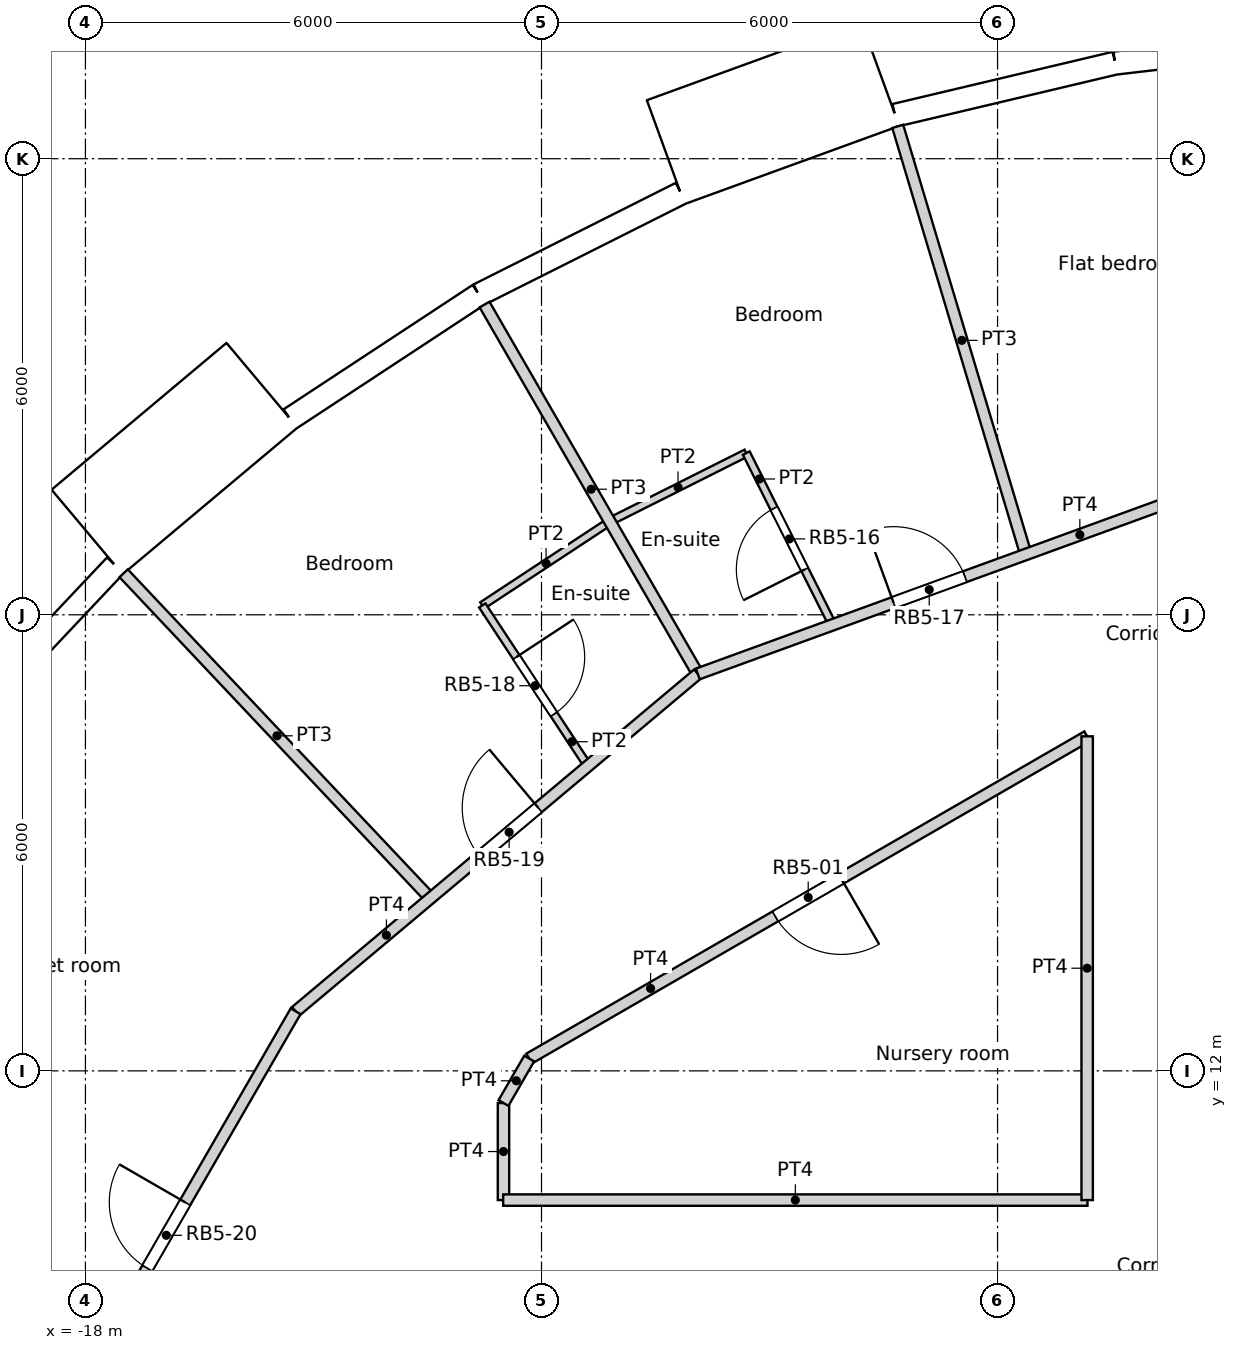
"""IFC4 building model, lengths in metres.
Left out: names, types, materials, properties, quantities, classifications, styles, units other than length and angle.
Written with IfcOpenShell. Run it as: python <this file> out.ifc"""

import sys

from ifc_helpers import new_model, si_unit, direction, frame, frame_2d, origin, origin_2d, place, context, subcontext, project, spatial, rectangle, circle, extrude, element, fill, save


model = new_model("IFC4")
c1 = context("Model", 3, precision=1e-05, world=origin(), true_north=direction((0.0, 1.0)))
c2 = subcontext(c1, "Body", "Model", "MODEL_VIEW")
j1 = project(units=[si_unit("LENGTHUNIT", "METRE"), si_unit("PLANEANGLEUNIT", "RADIAN")], contexts=[c1])
p1 = place(None, origin())
s1 = spatial("IfcSite", under=j1, at=p1, CompositionType="ELEMENT")
p2 = place(p1, origin())
s2 = spatial("IfcBuilding", under=s1, at=p2, CompositionType="ELEMENT")
p3 = place(p2, frame((0.0, 0.0, 169.2)))
s3 = spatial("IfcBuildingStorey", under=s2, at=p3, CompositionType="ELEMENT", Elevation=169.2)
for number, where, z_axis, x_axis in (
    (1, (-7.04, 23.516, 0.0), (0.0, 0.0, 1.0), (1.0, 0.0, 0.0)),
    (2, (-12.274, 21.259, 0.0), (0.0, 0.0, 1.0), (1.0, 0.0, 0.0)),
    (3, (-16.846, 17.855, 0.0), (0.0, 0.0, 1.0), (1.0, 0.0, 0.0)),
):
    element("IfcColumn", number, at=place(p3, frame(where, z_axis=z_axis, x_axis=x_axis)), inside=s3, PredefinedType="COLUMN", context=c2, shape_type="SweptSolid", body=[
        extrude(circle(Radius=0.6, at=origin_2d()), origin(), (0.0, 0.0, 1.0), 3.6),
    ])
for number, where, z_axis, x_axis in (
    (4, (-4.188, 18.35, 0.0), (0.0, 0.0, 1.0), (1.0, 0.0, 0.0)),
    (5, (-9.411, 16.301, 0.0), (0.0, 0.0, 1.0), (1.0, 0.0, 0.0)),
    (6, (-13.798, 12.802, 0.0), (0.0, 0.0, 1.0), (1.0, 0.0, 0.0)),
):
    element("IfcColumn", number, at=place(p3, frame(where, z_axis=z_axis, x_axis=x_axis)), inside=s3, PredefinedType="COLUMN", context=c2, shape_type="SweptSolid", body=[
        extrude(circle(Radius=0.65, at=origin_2d()), origin(), (0.0, 0.0, 1.0), 3.6),
    ])
p4 = place(p3, frame((-1.501, 25.603, 0.0), z_axis=(0.0, 0.0, 1.0), x_axis=(-0.993235542767, -0.116116995244, 0.0)))
e7 = element("IfcWall", 7, at=p4, inside=s3, PredefinedType="SOLIDWALL", context=c2, shape_type="SweptSolid", body=[
    extrude(rectangle(XDim=2.973, YDim=0.3, at=frame_2d((1.486, 0.0))), origin(), (0.0, 0.0, 1.0), 3.3),
])
p5 = place(p4, frame((1.486, 0.0, 1.55)))
e8 = element("IfcOpeningElement", 8, at=p5, cuts=e7, PredefinedType="OPENING", context=c2, shape_type="SweptSolid", body=[
    extrude(circle(Radius=0.9, at=origin_2d()), frame((0.0, 0.16, 0.0), z_axis=(0.0, -1.0, 0.0), x_axis=(1.0, 0.0, 0.0)), (0.0, 0.0, 1.0), 0.32),
])
p6 = place(p3, frame((-4.454, 25.258, 0.0), z_axis=(0.0, 0.0, 1.0), x_axis=(-0.973049746156, -0.230595298102, 0.0)))
e9 = element("IfcWall", 9, at=p6, inside=s3, PredefinedType="SOLIDWALL", context=c2, shape_type="SweptSolid", body=[
    extrude(rectangle(XDim=2.973, YDim=0.3, at=frame_2d((1.486, 0.0))), origin(), (0.0, 0.0, 1.0), 3.3),
])
p7 = place(p6, frame((1.486, 0.0, 1.55)))
e10 = element("IfcOpeningElement", 10, at=p7, cuts=e9, PredefinedType="OPENING", context=c2, shape_type="SweptSolid", body=[
    extrude(circle(Radius=0.9, at=origin_2d()), frame((0.0, 0.16, 0.0), z_axis=(0.0, -1.0, 0.0), x_axis=(1.0, 0.0, 0.0)), (0.0, 0.0, 1.0), 0.32),
])
p8 = place(p3, frame((-7.544, 25.113, -0.3), z_axis=(0.0, 0.0, 1.0), x_axis=(-0.939686455819, -0.342037080957, 0.0)))
e11 = element("IfcWall", 11, at=p8, inside=s3, PredefinedType="ELEMENTEDWALL", context=c2, shape_type="SweptSolid", body=[
    extrude(rectangle(XDim=3.0, YDim=1.45, at=frame_2d((1.5, 0.0))), origin(), (0.0, 0.0, 1.0), 3.6),
])
p9 = place(p8, frame((1.5, 0.0, 1.85)))
e12 = element("IfcOpeningElement", 12, at=p9, cuts=e11, PredefinedType="OPENING", context=c2, shape_type="SweptSolid", body=[
    extrude(circle(Radius=0.9, at=origin_2d()), frame((0.0, 0.735, 0.0), z_axis=(0.0, -1.0, 0.0), x_axis=(1.0, 0.0, 0.0)), (0.0, 0.0, 1.0), 1.47),
])
p10 = place(p3, frame((-10.167, 23.546, 0.0), z_axis=(0.0, 0.0, 1.0), x_axis=(-0.893637442555, -0.448789618045, 0.0)))
e13 = element("IfcWall", 13, at=p10, inside=s3, PredefinedType="SOLIDWALL", context=c2, shape_type="SweptSolid", body=[
    extrude(rectangle(XDim=2.973, YDim=0.3, at=frame_2d((1.486, 0.0))), origin(), (0.0, 0.0, 1.0), 3.3),
])
p11 = place(p10, frame((1.486, 0.0, 1.55)))
e14 = element("IfcOpeningElement", 14, at=p11, cuts=e13, PredefinedType="OPENING", context=c2, shape_type="SweptSolid", body=[
    extrude(circle(Radius=0.9, at=origin_2d()), frame((0.0, 0.16, 0.0), z_axis=(0.0, -1.0, 0.0), x_axis=(1.0, 0.0, 0.0)), (0.0, 0.0, 1.0), 0.32),
])
p12 = place(p3, frame((-12.824, 22.211, 0.0), z_axis=(0.0, 0.0, 1.0), x_axis=(-0.835470659512, -0.549535055382, 0.0)))
e15 = element("IfcWall", 15, at=p12, inside=s3, PredefinedType="SOLIDWALL", context=c2, shape_type="SweptSolid", body=[
    extrude(rectangle(XDim=2.973, YDim=0.3, at=frame_2d((1.487, 0.0))), origin(), (0.0, 0.0, 1.0), 3.3),
])
p13 = place(p12, frame((1.486, 0.0, 1.55)))
e16 = element("IfcOpeningElement", 16, at=p13, cuts=e15, PredefinedType="OPENING", context=c2, shape_type="SweptSolid", body=[
    extrude(circle(Radius=0.9, at=origin_2d()), frame((0.0, 0.16, 0.0), z_axis=(0.0, -1.0, 0.0), x_axis=(1.0, 0.0, 0.0)), (0.0, 0.0, 1.0), 0.32),
])
p14 = place(p3, frame((-15.678, 21.019, -0.3), z_axis=(0.0, 0.0, 1.0), x_axis=(-0.766022196139, -0.642814121673, 0.0)))
e17 = element("IfcWall", 17, at=p14, inside=s3, PredefinedType="ELEMENTEDWALL", context=c2, shape_type="SweptSolid", body=[
    extrude(rectangle(XDim=3.0, YDim=1.45, at=frame_2d((1.5, 0.0))), origin(), (0.0, 0.0, 1.0), 3.6),
])
p15 = place(p14, frame((1.5, 0.0, 1.85)))
e18 = element("IfcOpeningElement", 18, at=p15, cuts=e17, PredefinedType="OPENING", context=c2, shape_type="SweptSolid", body=[
    extrude(circle(Radius=0.9, at=origin_2d()), frame((0.0, 0.735, 0.0), z_axis=(0.0, -1.0, 0.0), x_axis=(1.0, 0.0, 0.0)), (0.0, 0.0, 1.0), 1.47),
])
p16 = place(p3, frame((-17.607, 18.648, 0.0), z_axis=(0.0, 0.0, 1.0), x_axis=(-0.686235184166, -0.727379730273, 0.0)))
e19 = element("IfcWall", 19, at=p16, inside=s3, PredefinedType="SOLIDWALL", context=c2, shape_type="SweptSolid", body=[
    extrude(rectangle(XDim=2.973, YDim=0.3, at=frame_2d((1.486, 0.0))), origin(), (0.0, 0.0, 1.0), 3.3),
])
p17 = place(p16, frame((1.486, 0.0, 1.55)))
e20 = element("IfcOpeningElement", 20, at=p17, cuts=e19, PredefinedType="OPENING", context=c2, shape_type="SweptSolid", body=[
    extrude(circle(Radius=0.9, at=origin_2d()), frame((0.0, 0.16, 0.0), z_axis=(0.0, -1.0, 0.0), x_axis=(1.0, 0.0, 0.0)), (0.0, 0.0, 1.0), 0.32),
])
p18 = place(p3, frame((-12.504, 10.3, 0.0), z_axis=(0.0, 0.0, 1.0), x_axis=(1.0, 0.0, 0.0)))
e21 = element("IfcWall", 21, at=p18, inside=s3, PredefinedType="PARTITIONING", context=c2, shape_type="SweptSolid", body=[
    extrude(rectangle(XDim=7.687, YDim=0.15, at=frame_2d((3.844, 0.0))), origin(), (0.0, 0.0, 1.0), 3.3),
])
p19 = place(p3, frame((-4.821, 10.3, 0.0), z_axis=(0.0, 0.0, 1.0), x_axis=(0.0, 1.0, 0.0)))
e22 = element("IfcWall", 22, at=p19, inside=s3, PredefinedType="PARTITIONING", context=c2, shape_type="SweptSolid", body=[
    extrude(rectangle(XDim=6.101, YDim=0.15, at=frame_2d((3.05, 0.0))), origin(), (0.0, 0.0, 1.0), 3.3),
])
p20 = place(p3, frame((-12.162, 12.162, 0.0), z_axis=(0.0, 0.0, 1.0), x_axis=(0.866004766557, 0.500035743023, 0.0)))
e23 = element("IfcWall", 23, at=p20, inside=s3, PredefinedType="PARTITIONING", context=c2, shape_type="SweptSolid", body=[
    extrude(rectangle(XDim=8.477, YDim=0.15, at=frame_2d((4.239, 0.0))), origin(), (0.0, 0.0, 1.0), 3.3),
])
p21 = place(p20, frame((3.739, 0.0, 0.0)))
e24 = element("IfcOpeningElement", 24, at=p21, cuts=e23, PredefinedType="OPENING", context=c2, shape_type="SweptSolid", body=[
    extrude(rectangle(XDim=1.0, YDim=2.04, at=frame_2d((0.5, 1.02))), frame((0.0, 0.075, 0.0), z_axis=(0.0, -1.0, 0.0), x_axis=(1.0, 0.0, 0.0)), (0.0, 0.0, 1.0), 0.15),
])
p22 = place(p3, frame((-9.944, 17.222, 0.0), z_axis=(0.0, 0.0, 1.0), x_axis=(0.939607544688, 0.342253797591, 0.0)))
e25 = element("IfcWall", 25, at=p22, inside=s3, PredefinedType="PARTITIONING", context=c2, shape_type="SweptSolid", body=[
    extrude(rectangle(XDim=6.908, YDim=0.15, at=frame_2d((3.454, 0.0))), origin(), (0.0, 0.0, 1.0), 3.3),
])
p23 = place(p22, frame((2.74, 0.0, 0.0)))
e26 = element("IfcOpeningElement", 26, at=p23, cuts=e25, PredefinedType="OPENING", context=c2, shape_type="SweptSolid", body=[
    extrude(rectangle(XDim=1.0, YDim=2.1, at=frame_2d((0.5, 1.05))), frame((0.0, 0.075, 0.0), z_axis=(0.0, -1.0, 0.0), x_axis=(1.0, 0.0, 0.0)), (0.0, 0.0, 1.0), 0.15),
])
p24 = place(p3, frame((-15.234, 12.783, 0.0), z_axis=(0.0, 0.0, 1.0), x_axis=(0.765918610974, 0.642937540795, 0.0)))
e27 = element("IfcWall", 27, at=p24, inside=s3, PredefinedType="PARTITIONING", context=c2, shape_type="SweptSolid", body=[
    extrude(rectangle(XDim=6.906, YDim=0.15, at=frame_2d((3.453, 0.0))), origin(), (0.0, 0.0, 1.0), 3.3),
])
p25 = place(p24, frame((3.167, 0.0, 0.0)))
e28 = element("IfcOpeningElement", 28, at=p25, cuts=e27, PredefinedType="OPENING", context=c2, shape_type="SweptSolid", body=[
    extrude(rectangle(XDim=1.0, YDim=2.1, at=frame_2d((0.5, 1.05))), frame((0.0, 0.075, 0.0), z_axis=(0.0, -1.0, 0.0), x_axis=(1.0, 0.0, 0.0)), (0.0, 0.0, 1.0), 0.15),
])
p26 = place(p3, frame((-12.5, 11.577, 0.0), z_axis=(0.0, 0.0, 1.0), x_axis=(0.500024767483, 0.866011103799, 0.0)))
e29 = element("IfcWall", 29, at=p26, inside=s3, PredefinedType="PARTITIONING", context=c2, shape_type="SweptSolid", body=[
    extrude(rectangle(XDim=0.676, YDim=0.15, at=frame_2d((0.338, 0.0))), origin(), (0.0, 0.0, 1.0), 3.3),
])
p27 = place(p3, frame((-12.5, 10.3, 0.0), z_axis=(0.0, 0.0, 1.0), x_axis=(0.0, 1.0, 0.0)))
e30 = element("IfcWall", 30, at=p27, inside=s3, PredefinedType="PARTITIONING", context=c2, shape_type="SweptSolid", body=[
    extrude(rectangle(XDim=1.277, YDim=0.15, at=frame_2d((0.638, 0.0))), origin(), (0.0, 0.0, 1.0), 3.3),
])
p28 = place(p3, frame((-18.688, 6.802, 0.0), z_axis=(0.0, 0.0, 1.0), x_axis=(0.499914202267, 0.866074933462, 0.0)))
e31 = element("IfcWall", 31, at=p28, inside=s3, PredefinedType="PARTITIONING", context=c2, shape_type="SweptSolid", body=[
    extrude(rectangle(XDim=6.907, YDim=0.15, at=frame_2d((3.454, 0.0))), origin(), (0.0, 0.0, 1.0), 3.3),
])
p29 = place(p28, frame((3.004, 0.0, 0.0)))
e32 = element("IfcOpeningElement", 32, at=p29, cuts=e31, PredefinedType="OPENING", context=c2, shape_type="SweptSolid", body=[
    extrude(rectangle(XDim=1.0, YDim=2.04, at=frame_2d((0.5, 1.02))), frame((0.0, 0.075, 0.0), z_axis=(0.0, -1.0, 0.0), x_axis=(1.0, 0.0, 0.0)), (0.0, 0.0, 1.0), 0.15),
])
p30 = place(p3, frame((-7.313, 24.426, 0.0), z_axis=(0.0, 0.0, 1.0), x_axis=(0.286833432865, -0.957980470464, 0.0)))
e33 = element("IfcWall", 33, at=p30, inside=s3, PredefinedType="PARTITIONING", context=c2, shape_type="SweptSolid", body=[
    extrude(rectangle(XDim=5.878, YDim=0.15, at=frame_2d((2.939, 0.0))), origin(), (0.0, 0.0, 1.0), 3.3),
])
p31 = place(p3, frame((-9.306, 20.128, 0.0), z_axis=(0.0, 0.0, 1.0), x_axis=(0.448950999616, -0.893556377597, 0.0)))
e34 = element("IfcWall", 34, at=p31, inside=s3, PredefinedType="PARTITIONING", context=c2, shape_type="SweptSolid", body=[
    extrude(rectangle(XDim=2.528, YDim=0.1, at=frame_2d((1.264, 0.0))), origin(), (0.0, 0.0, 1.0), 3.3),
])
p32 = place(p31, frame((0.814, 0.0, 0.0)))
e35 = element("IfcOpeningElement", 35, at=p32, cuts=e34, PredefinedType="OPENING", context=c2, shape_type="SweptSolid", body=[
    extrude(rectangle(XDim=0.9, YDim=2.04, at=frame_2d((0.45, 1.02))), frame((0.0, 0.05, 0.0), z_axis=(0.0, -1.0, 0.0), x_axis=(1.0, 0.0, 0.0)), (0.0, 0.0, 1.0), 0.1),
])
p33 = place(p3, frame((-11.101, 19.227, 0.0), z_axis=(0.0, 0.0, 1.0), x_axis=(0.8937698483, 0.448525872464, 0.0)))
e36 = element("IfcWall", 36, at=p33, inside=s3, PredefinedType="PARTITIONING", context=c2, shape_type="SweptSolid", body=[
    extrude(rectangle(XDim=2.009, YDim=0.1, at=frame_2d((1.004, 0.0))), origin(), (0.0, 0.0, 1.0), 3.3),
])
p34 = place(p3, frame((-12.749, 22.081, 0.0), z_axis=(0.0, 0.0, 1.0), x_axis=(0.500061505771, -0.865989890499, 0.0)))
e37 = element("IfcWall", 37, at=p34, inside=s3, PredefinedType="PARTITIONING", context=c2, shape_type="SweptSolid", body=[
    extrude(rectangle(XDim=5.61, YDim=0.15, at=frame_2d((2.805, 0.0))), origin(), (0.0, 0.0, 1.0), 3.3),
])
p35 = place(p3, frame((-12.779, 18.123, 0.0), z_axis=(0.0, 0.0, 1.0), x_axis=(0.835400926368, 0.549641057622, 0.0)))
e38 = element("IfcWall", 38, at=p35, inside=s3, PredefinedType="PARTITIONING", context=c2, shape_type="SweptSolid", body=[
    extrude(rectangle(XDim=2.009, YDim=0.1, at=frame_2d((1.004, 0.0))), origin(), (0.0, 0.0, 1.0), 3.3),
])
p36 = place(p3, frame((-12.779, 18.123, 0.0), z_axis=(0.0, 0.0, 1.0), x_axis=(0.549788507485, -0.835303895021, 0.0)))
e39 = element("IfcWall", 39, at=p36, inside=s3, PredefinedType="PARTITIONING", context=c2, shape_type="SweptSolid", body=[
    extrude(rectangle(XDim=2.529, YDim=0.1, at=frame_2d((1.264, 0.0))), origin(), (0.0, 0.0, 1.0), 3.3),
])
p37 = place(p36, frame((0.814, 0.0, 0.0)))
e40 = element("IfcOpeningElement", 40, at=p37, cuts=e39, PredefinedType="OPENING", context=c2, shape_type="SweptSolid", body=[
    extrude(rectangle(XDim=0.9, YDim=2.04, at=frame_2d((0.45, 1.02))), frame((0.0, 0.05, 0.0), z_axis=(0.0, -1.0, 0.0), x_axis=(1.0, 0.0, 0.0)), (0.0, 0.0, 1.0), 0.1),
])
p38 = place(p3, frame((-17.497, 18.546, 0.0), z_axis=(0.0, 0.0, 1.0), x_axis=(0.6862502776, -0.72736549031, 0.0)))
e41 = element("IfcWall", 41, at=p38, inside=s3, PredefinedType="PARTITIONING", context=c2, shape_type="SweptSolid", body=[
    extrude(rectangle(XDim=5.879, YDim=0.15, at=frame_2d((2.939, 0.0))), origin(), (0.0, 0.0, 1.0), 3.3),
])
p39 = place(p7, origin())
e42 = element("IfcWindow", 42, at=p39, inside=s3, PartitioningType="SINGLE_PANEL", PredefinedType="WINDOW", context=c2, shape_type="SweptSolid", body=[
    extrude(circle(Radius=0.9, at=origin_2d()), frame((0.0, 0.12, 0.0), z_axis=(0.0, -1.0, 0.0), x_axis=(1.0, 0.0, 0.0)), (0.0, 0.0, 1.0), 0.1),
])
fill(e10, e42)
p40 = place(p9, origin())
e43 = element("IfcWindow", 43, at=p40, inside=s3, PartitioningType="SINGLE_PANEL", PredefinedType="WINDOW", context=c2, shape_type="SweptSolid", body=[
    extrude(circle(Radius=0.9, at=origin_2d()), frame((0.0, 0.695, 0.0), z_axis=(0.0, -1.0, 0.0), x_axis=(1.0, 0.0, 0.0)), (0.0, 0.0, 1.0), 0.1),
])
fill(e12, e43)
p41 = place(p11, origin())
e44 = element("IfcWindow", 44, at=p41, inside=s3, PartitioningType="SINGLE_PANEL", PredefinedType="WINDOW", context=c2, shape_type="SweptSolid", body=[
    extrude(circle(Radius=0.9, at=origin_2d()), frame((0.0, 0.12, 0.0), z_axis=(0.0, -1.0, 0.0), x_axis=(1.0, 0.0, 0.0)), (0.0, 0.0, 1.0), 0.1),
])
fill(e14, e44)
p42 = place(p13, origin())
e45 = element("IfcWindow", 45, at=p42, inside=s3, PartitioningType="SINGLE_PANEL", PredefinedType="WINDOW", context=c2, shape_type="SweptSolid", body=[
    extrude(circle(Radius=0.9, at=origin_2d()), frame((0.0, 0.12, 0.0), z_axis=(0.0, -1.0, 0.0), x_axis=(1.0, 0.0, 0.0)), (0.0, 0.0, 1.0), 0.1),
])
fill(e16, e45)
p43 = place(p15, origin())
e46 = element("IfcWindow", 46, at=p43, inside=s3, PartitioningType="SINGLE_PANEL", PredefinedType="WINDOW", context=c2, shape_type="SweptSolid", body=[
    extrude(circle(Radius=0.9, at=origin_2d()), frame((0.0, 0.695, 0.0), z_axis=(0.0, -1.0, 0.0), x_axis=(1.0, 0.0, 0.0)), (0.0, 0.0, 1.0), 0.1),
])
fill(e18, e46)
p44 = place(p17, origin())
e47 = element("IfcWindow", 47, at=p44, inside=s3, PartitioningType="SINGLE_PANEL", PredefinedType="WINDOW", context=c2, shape_type="SweptSolid", body=[
    extrude(circle(Radius=0.9, at=origin_2d()), frame((0.0, 0.12, 0.0), z_axis=(0.0, -1.0, 0.0), x_axis=(1.0, 0.0, 0.0)), (0.0, 0.0, 1.0), 0.1),
])
fill(e20, e47)
p45 = place(p21, origin())
e48 = element("IfcDoor", 48, at=p45, inside=s3, OperationType="SINGLE_SWING_LEFT", PredefinedType="DOOR", context=c2, shape_type="SweptSolid", body=[
    extrude(rectangle(XDim=1.0, YDim=2.04, at=frame_2d((0.5, 1.02))), frame((0.0, 0.025, 0.0), z_axis=(0.0, -1.0, 0.0), x_axis=(1.0, 0.0, 0.0)), (0.0, 0.0, 1.0), 0.05),
])
fill(e24, e48)
p46 = place(p32, origin())
e49 = element("IfcDoor", 49, at=p46, inside=s3, OperationType="SINGLE_SWING_LEFT", PredefinedType="DOOR", context=c2, shape_type="SweptSolid", body=[
    extrude(rectangle(XDim=0.9, YDim=2.04, at=frame_2d((0.45, 1.02))), frame((0.0, 0.025, 0.0), z_axis=(0.0, -1.0, 0.0), x_axis=(1.0, 0.0, 0.0)), (0.0, 0.0, 1.0), 0.05),
])
fill(e35, e49)
p47 = place(p23, origin())
e50 = element("IfcDoor", 50, at=p47, inside=s3, OperationType="SINGLE_SWING_LEFT", PredefinedType="DOOR", context=c2, shape_type="SweptSolid", body=[
    extrude(rectangle(XDim=1.0, YDim=2.1, at=frame_2d((0.5, 1.05))), frame((0.0, 0.025, 0.0), z_axis=(0.0, -1.0, 0.0), x_axis=(1.0, 0.0, 0.0)), (0.0, 0.0, 1.0), 0.05),
])
fill(e26, e50)
p48 = place(p37, origin())
e51 = element("IfcDoor", 51, at=p48, inside=s3, OperationType="SINGLE_SWING_LEFT", PredefinedType="DOOR", context=c2, shape_type="SweptSolid", body=[
    extrude(rectangle(XDim=0.9, YDim=2.04, at=frame_2d((0.45, 1.02))), frame((0.0, 0.025, 0.0), z_axis=(0.0, -1.0, 0.0), x_axis=(1.0, 0.0, 0.0)), (0.0, 0.0, 1.0), 0.05),
])
fill(e40, e51)
p49 = place(p25, origin())
e52 = element("IfcDoor", 52, at=p49, inside=s3, OperationType="SINGLE_SWING_RIGHT", PredefinedType="DOOR", context=c2, shape_type="SweptSolid", body=[
    extrude(rectangle(XDim=1.0, YDim=2.1, at=frame_2d((0.5, 1.05))), frame((0.0, 0.025, 0.0), z_axis=(0.0, -1.0, 0.0), x_axis=(1.0, 0.0, 0.0)), (0.0, 0.0, 1.0), 0.05),
])
fill(e28, e52)
p50 = place(p29, origin())
e53 = element("IfcDoor", 53, at=p50, inside=s3, OperationType="SINGLE_SWING_RIGHT", PredefinedType="DOOR", context=c2, shape_type="SweptSolid", body=[
    extrude(rectangle(XDim=1.0, YDim=2.04, at=frame_2d((0.5, 1.02))), frame((0.0, 0.025, 0.0), z_axis=(0.0, -1.0, 0.0), x_axis=(1.0, 0.0, 0.0)), (0.0, 0.0, 1.0), 0.05),
])
fill(e32, e53)
save(model, sys.argv[1])
